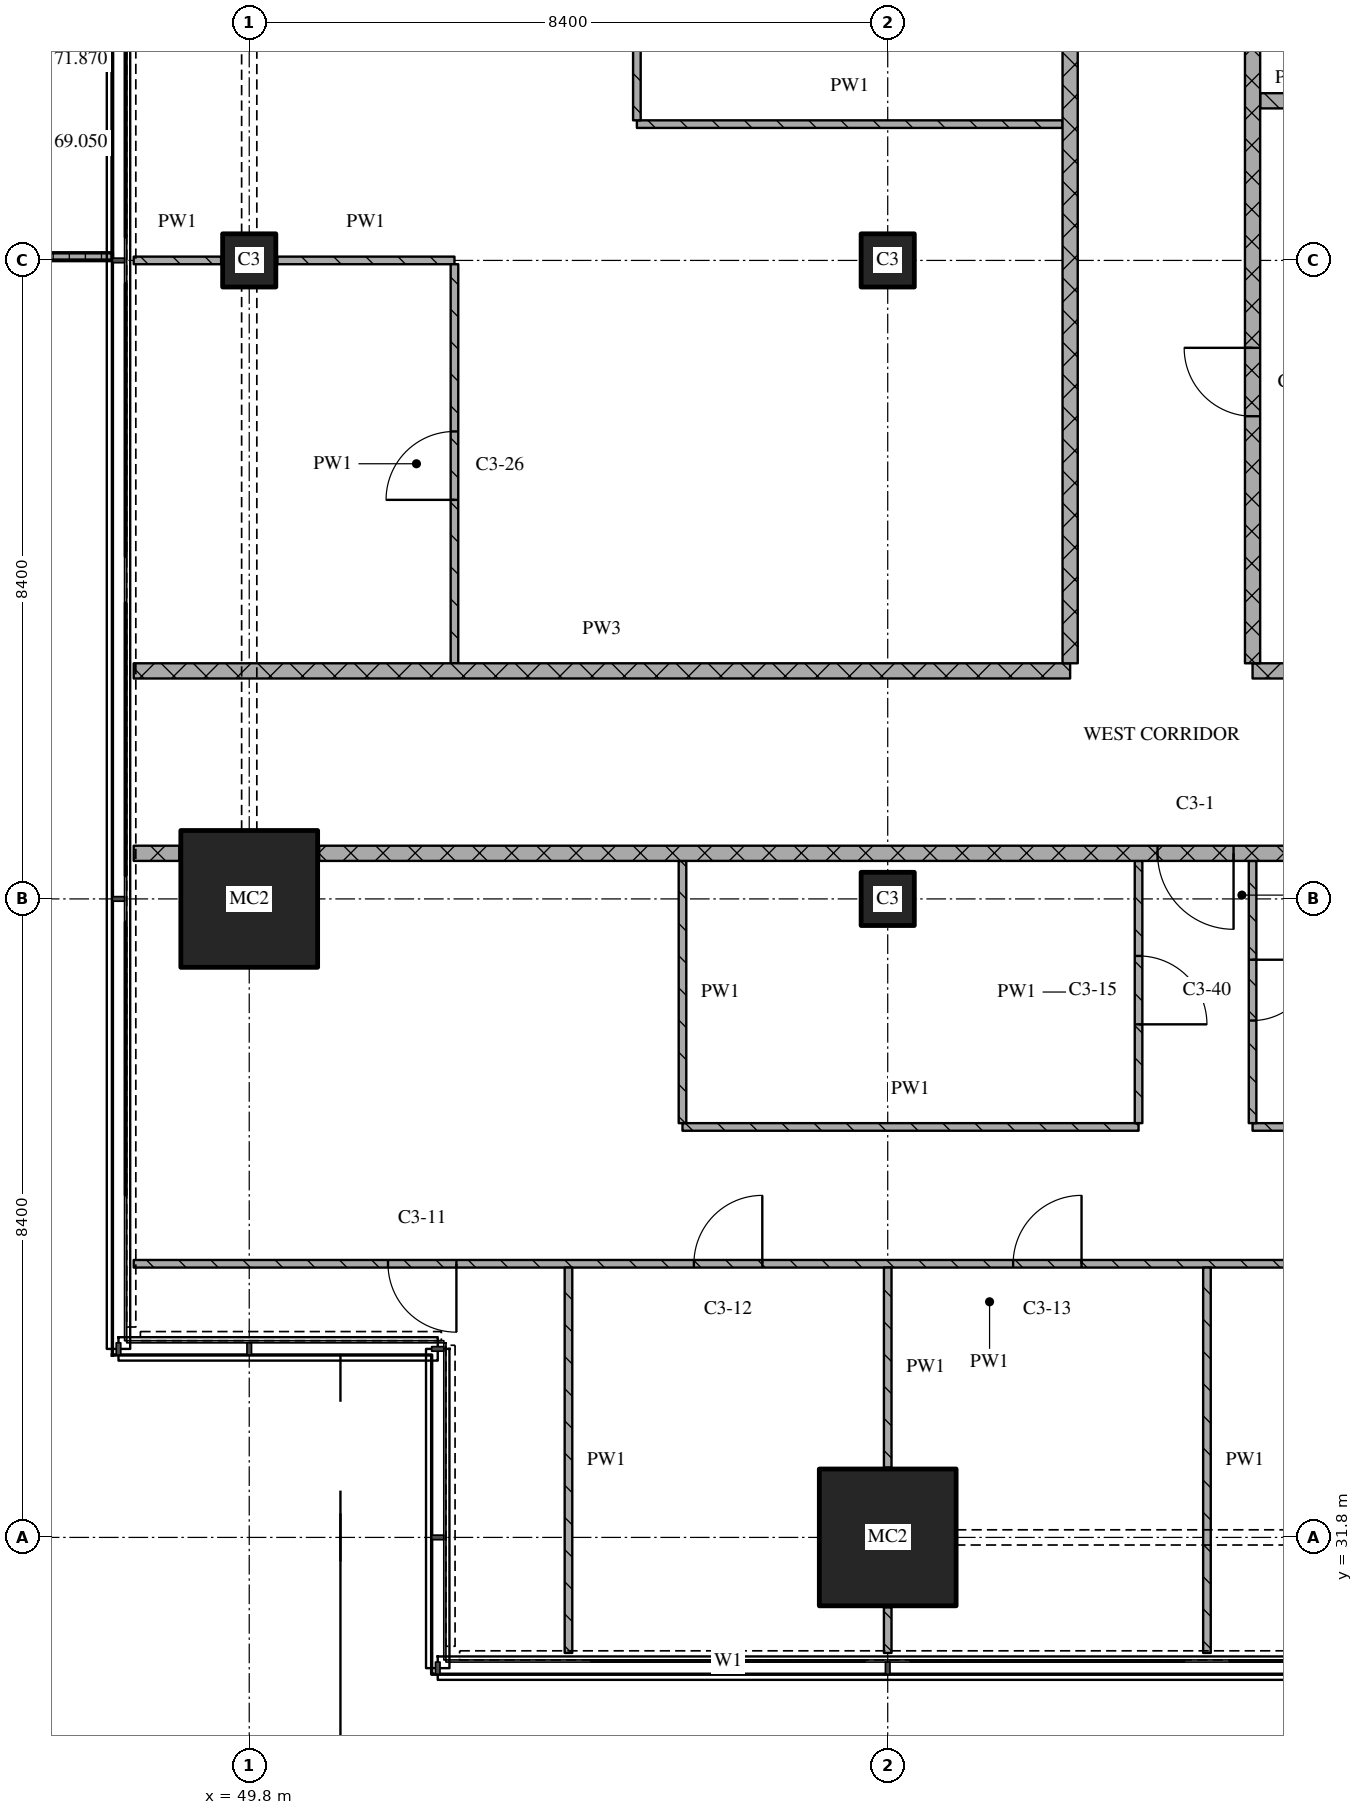
"""IFC4 building model, lengths in metres.
Left out: names, types, materials, properties, quantities, classifications, styles, units other than length and angle.
Written with IfcOpenShell. Run it as: python <this file> out.ifc"""

import sys

from ifc_helpers import new_model, si_unit, direction, frame, frame_2d, origin, origin_2d, place, context, subcontext, project, spatial, polyline, rectangle, outline, extrude, element, fill, save


model = new_model("IFC4")
c1 = context("Model", 3, precision=1e-05, world=origin(), true_north=direction((0.0, 1.0)))
c2 = subcontext(c1, "Body", "Model", "MODEL_VIEW")
j1 = project(units=[si_unit("LENGTHUNIT", "METRE"), si_unit("PLANEANGLEUNIT", "RADIAN")], contexts=[c1])
p1 = place(None, origin())
s1 = spatial("IfcSite", under=j1, at=p1, CompositionType="ELEMENT")
p2 = place(p1, origin())
s2 = spatial("IfcBuilding", under=s1, at=p2, CompositionType="ELEMENT")
p3 = place(p2, frame((0.0, 0.0, 169.05)))
s3 = spatial("IfcBuildingStorey", under=s2, at=p3, CompositionType="ELEMENT", Elevation=169.05)
p4 = place(p3, frame((49.8, 40.2, 0.0), z_axis=(0.0, 0.0, 1.0), x_axis=(1.0, 0.0, 0.0)))
e1 = element("IfcColumn", 1, at=p4, inside=s3, PredefinedType="COLUMN", context=c2, shape_type="SweptSolid", body=[
    extrude(rectangle(XDim=1.8, YDim=1.8, at=origin_2d()), origin(), (0.0, 0.0, 1.0), 3.6),
])
p5 = place(p3, frame((49.8, 48.6, 0.0), z_axis=(0.0, 0.0, 1.0), x_axis=(1.0, 0.0, 0.0)))
e2 = element("IfcColumn", 2, at=p5, inside=s3, PredefinedType="COLUMN", context=c2, shape_type="SweptSolid", body=[
    extrude(rectangle(XDim=0.7, YDim=0.7, at=origin_2d()), origin(), (0.0, 0.0, 1.0), 3.6),
])
p6 = place(p3, frame((58.2, 31.8, 0.0), z_axis=(0.0, 0.0, 1.0), x_axis=(1.0, 0.0, 0.0)))
e3 = element("IfcColumn", 3, at=p6, inside=s3, PredefinedType="COLUMN", context=c2, shape_type="SweptSolid", body=[
    extrude(rectangle(XDim=1.8, YDim=1.8, at=origin_2d()), origin(), (0.0, 0.0, 1.0), 3.6),
])
for number, where, z_axis, x_axis in (
    (4, (58.2, 40.2, 0.0), (0.0, 0.0, 1.0), (1.0, 0.0, 0.0)),
    (5, (58.2, 48.6, 0.0), (0.0, 0.0, 1.0), (1.0, 0.0, 0.0)),
):
    element("IfcColumn", number, at=place(p3, frame(where, z_axis=z_axis, x_axis=x_axis)), inside=s3, PredefinedType="COLUMN", context=c2, shape_type="SweptSolid", body=[
        extrude(rectangle(XDim=0.7, YDim=0.7, at=origin_2d()), origin(), (0.0, 0.0, 1.0), 3.6),
    ])
p7 = place(p3, origin())
e6 = element("IfcWall", 6, at=p7, inside=s3, PredefinedType="SOLIDWALL", context=c2, shape_type="SweptSolid", body=[
    extrude(outline(polyline([(48.0, 52.8), (48.0, 52.7), (46.367, 52.7), (46.367, 48.7), (48.0, 48.7), (48.0, 48.6), (46.267, 48.6), (46.267, 52.8), (48.0, 52.8)])), origin(), (0.0, 0.0, 1.0), 1.0),
])
p8 = place(p3, frame((70.8, 35.4, 0.0), z_axis=(0.0, 0.0, 1.0), x_axis=(-1.0, 0.0, 0.0)))
e7 = element("IfcWall", 7, at=p8, inside=s3, PredefinedType="PARTITIONING", context=c2, shape_type="SweptSolid", body=[
    extrude(rectangle(XDim=22.52, YDim=0.1, at=frame_2d((11.26, 0.0))), origin(), (0.0, 0.0, 1.0), 3.32),
])
p9 = place(p8, frame((10.05, 0.0, 0.0)))
e8 = element("IfcOpeningElement", 8, at=p9, cuts=e7, PredefinedType="OPENING", context=c2, shape_type="SweptSolid", body=[
    extrude(rectangle(XDim=0.9, YDim=2.1, at=frame_2d((0.45, 1.05))), frame((0.0, 0.06, 0.0), z_axis=(0.0, -1.0, 0.0), x_axis=(1.0, 0.0, 0.0)), (0.0, 0.0, 1.0), 0.12),
])
p10 = place(p8, frame((14.25, 0.0, 0.0)))
e9 = element("IfcOpeningElement", 9, at=p10, cuts=e7, PredefinedType="OPENING", context=c2, shape_type="SweptSolid", body=[
    extrude(rectangle(XDim=0.9, YDim=2.1, at=frame_2d((0.45, 1.05))), frame((0.0, 0.06, 0.0), z_axis=(0.0, -1.0, 0.0), x_axis=(1.0, 0.0, 0.0)), (0.0, 0.0, 1.0), 0.12),
])
p11 = place(p8, frame((18.274, 0.0, 0.0)))
e10 = element("IfcOpeningElement", 10, at=p11, cuts=e7, PredefinedType="OPENING", context=c2, shape_type="SweptSolid", body=[
    extrude(rectangle(XDim=0.9, YDim=2.1, at=frame_2d((0.45, 1.05))), frame((0.0, 0.06, 0.0), z_axis=(0.0, -1.0, 0.0), x_axis=(1.0, 0.0, 0.0)), (0.0, 0.0, 1.0), 0.12),
])
p12 = place(p3, frame((55.5, 37.2, 0.0), z_axis=(0.0, 0.0, 1.0), x_axis=(1.0, 0.0, 0.0)))
e11 = element("IfcWall", 11, at=p12, inside=s3, PredefinedType="PARTITIONING", context=c2, shape_type="SweptSolid", body=[
    extrude(rectangle(XDim=6.0, YDim=0.1, at=frame_2d((3.0, 0.0))), origin(), (0.0, 0.0, 1.0), 3.32),
])
p13 = place(p3, frame((63.0, 37.2, 0.0), z_axis=(0.0, 0.0, 1.0), x_axis=(1.0, 0.0, 0.0)))
e12 = element("IfcWall", 12, at=p13, inside=s3, PredefinedType="PARTITIONING", context=c2, shape_type="SweptSolid", body=[
    extrude(rectangle(XDim=11.9, YDim=0.1, at=frame_2d((5.95, 0.0))), origin(), (0.0, 0.0, 1.0), 3.32),
])
p14 = place(p13, frame((6.35, 0.0, 0.0)))
e13 = element("IfcOpeningElement", 13, at=p14, cuts=e12, PredefinedType="OPENING", context=c2, shape_type="SweptSolid", body=[
    extrude(rectangle(XDim=0.8, YDim=2.1, at=frame_2d((0.4, 1.05))), frame((0.0, 0.06, 0.0), z_axis=(0.0, -1.0, 0.0), x_axis=(1.0, 0.0, 0.0)), (0.0, 0.0, 1.0), 0.12),
])
p15 = place(p13, frame((10.05, 0.0, 0.0)))
e14 = element("IfcOpeningElement", 14, at=p15, cuts=e12, PredefinedType="OPENING", context=c2, shape_type="SweptSolid", body=[
    extrude(rectangle(XDim=0.9, YDim=2.1, at=frame_2d((0.45, 1.05))), frame((0.0, 0.06, 0.0), z_axis=(0.0, -1.0, 0.0), x_axis=(1.0, 0.0, 0.0)), (0.0, 0.0, 1.0), 0.12),
])
p16 = place(p3, frame((48.28, 40.8, 0.0), z_axis=(0.0, 0.0, 1.0), x_axis=(1.0, 0.0, 0.0)))
e15 = element("IfcWall", 15, at=p16, inside=s3, PredefinedType="PARTITIONING", context=c2, shape_type="SweptSolid", body=[
    extrude(rectangle(XDim=0.6, YDim=0.2, at=frame_2d((0.3, 0.0))), origin(), (0.0, 0.0, 1.0), 3.32),
])
p17 = place(p3, frame((75.0, 40.8, 0.0), z_axis=(0.0, 0.0, 1.0), x_axis=(-1.0, 0.0, 0.0)))
e16 = element("IfcWall", 16, at=p17, inside=s3, PredefinedType="PARTITIONING", context=c2, shape_type="SweptSolid", body=[
    extrude(rectangle(XDim=24.28, YDim=0.2, at=frame_2d((12.14, 0.0))), origin(), (0.0, 0.0, 1.0), 3.32),
])
p18 = place(p17, frame((12.25, 0.0, 0.0)))
e17 = element("IfcOpeningElement", 17, at=p18, cuts=e16, PredefinedType="OPENING", context=c2, shape_type="SweptSolid", body=[
    extrude(rectangle(XDim=1.0, YDim=2.1, at=frame_2d((0.5, 1.05))), frame((0.0, 0.11, 0.0), z_axis=(0.0, -1.0, 0.0), x_axis=(1.0, 0.0, 0.0)), (0.0, 0.0, 1.0), 0.22),
])
p19 = place(p3, frame((48.28, 43.2, 0.0), z_axis=(0.0, 0.0, 1.0), x_axis=(1.0, 0.0, 0.0)))
e18 = element("IfcWall", 18, at=p19, inside=s3, PredefinedType="PARTITIONING", context=c2, shape_type="SweptSolid", body=[
    extrude(rectangle(XDim=12.32, YDim=0.2, at=frame_2d((6.16, 0.0))), origin(), (0.0, 0.0, 1.0), 3.32),
])
p20 = place(p3, frame((63.0, 43.2, 0.0), z_axis=(0.0, 0.0, 1.0), x_axis=(1.0, 0.0, 0.0)))
e19 = element("IfcWall", 19, at=p20, inside=s3, PredefinedType="PARTITIONING", context=c2, shape_type="SweptSolid", body=[
    extrude(rectangle(XDim=5.2, YDim=0.2, at=frame_2d((2.6, 0.0))), origin(), (0.0, 0.0, 1.0), 3.32),
])
p21 = place(p3, frame((48.28, 48.6, 0.0), z_axis=(0.0, 0.0, 1.0), x_axis=(1.0, 0.0, 0.0)))
e20 = element("IfcWall", 20, at=p21, inside=s3, PredefinedType="PARTITIONING", context=c2, shape_type="SweptSolid", body=[
    extrude(rectangle(XDim=1.15, YDim=0.1, at=frame_2d((0.575, 0.0))), origin(), (0.0, 0.0, 1.0), 3.32),
])
p22 = place(p3, frame((50.17, 48.6, 0.0), z_axis=(0.0, 0.0, 1.0), x_axis=(1.0, 0.0, 0.0)))
e21 = element("IfcWall", 21, at=p22, inside=s3, PredefinedType="PARTITIONING", context=c2, shape_type="SweptSolid", body=[
    extrude(rectangle(XDim=2.33, YDim=0.1, at=frame_2d((1.165, 0.0))), origin(), (0.0, 0.0, 1.0), 3.32),
])
p23 = place(p3, frame((54.9, 50.393, 0.0), z_axis=(0.0, 0.0, 1.0), x_axis=(1.0, 0.0, 0.0)))
e22 = element("IfcWall", 22, at=p23, inside=s3, PredefinedType="PARTITIONING", context=c2, shape_type="SweptSolid", body=[
    extrude(rectangle(XDim=5.6, YDim=0.1, at=frame_2d((2.8, 0.0))), origin(), (0.0, 0.0, 1.0), 3.32),
])
p24 = place(p3, frame((63.1, 50.7, 0.0), z_axis=(0.0, 0.0, 1.0), x_axis=(1.0, 0.0, 0.0)))
e23 = element("IfcWall", 23, at=p24, inside=s3, PredefinedType="PARTITIONING", context=c2, shape_type="SweptSolid", body=[
    extrude(rectangle(XDim=5.1, YDim=0.2, at=frame_2d((2.55, 0.0))), origin(), (0.0, 0.0, 1.0), 3.32),
])
p25 = place(p3, frame((52.5, 43.3, 0.0), z_axis=(0.0, 0.0, 1.0), x_axis=(0.0, 1.0, 0.0)))
e24 = element("IfcWall", 24, at=p25, inside=s3, PredefinedType="PARTITIONING", context=c2, shape_type="SweptSolid", body=[
    extrude(rectangle(XDim=5.25, YDim=0.1, at=frame_2d((2.625, 0.0))), origin(), (0.0, 0.0, 1.0), 3.32),
])
p26 = place(p25, frame((2.15, 0.0, 0.0)))
e25 = element("IfcOpeningElement", 25, at=p26, cuts=e24, PredefinedType="OPENING", context=c2, shape_type="SweptSolid", body=[
    extrude(rectangle(XDim=0.9, YDim=2.1, at=frame_2d((0.45, 1.05))), frame((0.0, 0.06, 0.0), z_axis=(0.0, -1.0, 0.0), x_axis=(1.0, 0.0, 0.0)), (0.0, 0.0, 1.0), 0.12),
])
p27 = place(p3, frame((54.0, 35.35, 0.0), z_axis=(0.0, 0.0, 1.0), x_axis=(0.0, -1.0, 0.0)))
e26 = element("IfcWall", 26, at=p27, inside=s3, PredefinedType="PARTITIONING", context=c2, shape_type="SweptSolid", body=[
    extrude(rectangle(XDim=5.07, YDim=0.1, at=frame_2d((2.535, 0.0))), origin(), (0.0, 0.0, 1.0), 3.32),
])
p28 = place(p3, frame((54.9, 54.85, 0.0), z_axis=(0.0, 0.0, 1.0), x_axis=(0.0, -1.0, 0.0)))
e27 = element("IfcWall", 27, at=p28, inside=s3, PredefinedType="PARTITIONING", context=c2, shape_type="SweptSolid", body=[
    extrude(rectangle(XDim=4.407, YDim=0.1, at=frame_2d((2.204, 0.0))), origin(), (0.0, 0.0, 1.0), 3.32),
])
p29 = place(p3, frame((55.5, 40.7, 0.0), z_axis=(0.0, 0.0, 1.0), x_axis=(0.0, -1.0, 0.0)))
e28 = element("IfcWall", 28, at=p29, inside=s3, PredefinedType="PARTITIONING", context=c2, shape_type="SweptSolid", body=[
    extrude(rectangle(XDim=3.45, YDim=0.1, at=frame_2d((1.725, 0.0))), origin(), (0.0, 0.0, 1.0), 3.32),
])
p30 = place(p3, frame((58.2, 30.88, 0.0), z_axis=(0.0, 0.0, 1.0), x_axis=(0.0, -1.0, 0.0)))
e29 = element("IfcWall", 29, at=p30, inside=s3, PredefinedType="PARTITIONING", context=c2, shape_type="SweptSolid", body=[
    extrude(rectangle(XDim=0.6, YDim=0.1, at=frame_2d((0.3, 0.0))), origin(), (0.0, 0.0, 1.0), 3.32),
])
p31 = place(p3, frame((58.2, 35.35, 0.0), z_axis=(0.0, 0.0, 1.0), x_axis=(0.0, -1.0, 0.0)))
e30 = element("IfcWall", 30, at=p31, inside=s3, PredefinedType="PARTITIONING", context=c2, shape_type="SweptSolid", body=[
    extrude(rectangle(XDim=2.63, YDim=0.1, at=frame_2d((1.315, 0.0))), origin(), (0.0, 0.0, 1.0), 3.32),
])
p32 = place(p3, frame((60.6, 43.3, 0.0), z_axis=(0.0, 0.0, 1.0), x_axis=(0.0, 1.0, 0.0)))
e31 = element("IfcWall", 31, at=p32, inside=s3, PredefinedType="PARTITIONING", context=c2, shape_type="SweptSolid", body=[
    extrude(rectangle(XDim=17.8, YDim=0.2, at=frame_2d((8.9, 0.0))), origin(), (0.0, 0.0, 1.0), 3.32),
])
p33 = place(p32, frame((11.85, 0.0, 0.0)))
e32 = element("IfcOpeningElement", 32, at=p33, cuts=e31, PredefinedType="OPENING", context=c2, shape_type="SweptSolid", body=[
    extrude(rectangle(XDim=1.0, YDim=2.1, at=frame_2d((0.5, 1.05))), frame((0.0, 0.11, 0.0), z_axis=(0.0, -1.0, 0.0), x_axis=(1.0, 0.0, 0.0)), (0.0, 0.0, 1.0), 0.22),
])
p34 = place(p3, frame((61.5, 37.25, 0.0), z_axis=(0.0, 0.0, 1.0), x_axis=(0.0, 1.0, 0.0)))
e33 = element("IfcWall", 33, at=p34, inside=s3, PredefinedType="PARTITIONING", context=c2, shape_type="SweptSolid", body=[
    extrude(rectangle(XDim=3.45, YDim=0.1, at=frame_2d((1.725, 0.0))), origin(), (0.0, 0.0, 1.0), 3.32),
])
p35 = place(p34, frame((1.3, 0.0, 0.0)))
e34 = element("IfcOpeningElement", 34, at=p35, cuts=e33, PredefinedType="OPENING", context=c2, shape_type="SweptSolid", body=[
    extrude(rectangle(XDim=0.9, YDim=2.1, at=frame_2d((0.45, 1.05))), frame((0.0, 0.06, 0.0), z_axis=(0.0, -1.0, 0.0), x_axis=(1.0, 0.0, 0.0)), (0.0, 0.0, 1.0), 0.12),
])
p36 = place(p3, frame((62.4, 35.35, 0.0), z_axis=(0.0, 0.0, 1.0), x_axis=(0.0, -1.0, 0.0)))
e35 = element("IfcWall", 35, at=p36, inside=s3, PredefinedType="PARTITIONING", context=c2, shape_type="SweptSolid", body=[
    extrude(rectangle(XDim=5.07, YDim=0.1, at=frame_2d((2.535, 0.0))), origin(), (0.0, 0.0, 1.0), 3.32),
])
p37 = place(p3, frame((63.0, 58.7, 0.0), z_axis=(0.0, 0.0, 1.0), x_axis=(0.0, -1.0, 0.0)))
e36 = element("IfcWall", 36, at=p37, inside=s3, PredefinedType="PARTITIONING", context=c2, shape_type="SweptSolid", body=[
    extrude(rectangle(XDim=15.4, YDim=0.2, at=frame_2d((7.7, 0.0))), origin(), (0.0, 0.0, 1.0), 3.32),
])
p38 = place(p37, frame((3.45, 0.0, 0.0)))
e37 = element("IfcOpeningElement", 37, at=p38, cuts=e36, PredefinedType="OPENING", context=c2, shape_type="SweptSolid", body=[
    extrude(rectangle(XDim=1.0, YDim=2.1, at=frame_2d((0.5, 1.05))), frame((0.0, 0.11, 0.0), z_axis=(0.0, -1.0, 0.0), x_axis=(1.0, 0.0, 0.0)), (0.0, 0.0, 1.0), 0.22),
])
p39 = place(p37, frame((11.25, 0.0, 0.0)))
e38 = element("IfcOpeningElement", 38, at=p39, cuts=e36, PredefinedType="OPENING", context=c2, shape_type="SweptSolid", body=[
    extrude(rectangle(XDim=0.9, YDim=2.1, at=frame_2d((0.45, 1.05))), frame((0.0, 0.11, 0.0), z_axis=(0.0, -1.0, 0.0), x_axis=(1.0, 0.0, 0.0)), (0.0, 0.0, 1.0), 0.22),
])
p40 = place(p3, frame((63.0, 40.7, 0.0), z_axis=(0.0, 0.0, 1.0), x_axis=(0.0, -1.0, 0.0)))
e39 = element("IfcWall", 39, at=p40, inside=s3, PredefinedType="PARTITIONING", context=c2, shape_type="SweptSolid", body=[
    extrude(rectangle(XDim=3.45, YDim=0.1, at=frame_2d((1.725, 0.0))), origin(), (0.0, 0.0, 1.0), 3.32),
])
p41 = place(p40, frame((1.3, 0.0, 0.0)))
e40 = element("IfcOpeningElement", 40, at=p41, cuts=e39, PredefinedType="OPENING", context=c2, shape_type="SweptSolid", body=[
    extrude(rectangle(XDim=0.8, YDim=2.1, at=frame_2d((0.4, 1.05))), frame((0.0, 0.06, 0.0), z_axis=(0.0, -1.0, 0.0), x_axis=(1.0, 0.0, 0.0)), (0.0, 0.0, 1.0), 0.12),
])
p42 = place(p9, origin())
e41 = element("IfcDoor", 41, at=p42, inside=s3, OperationType="SINGLE_SWING_RIGHT", PredefinedType="DOOR", context=c2, shape_type="SweptSolid", body=[
    extrude(rectangle(XDim=0.9, YDim=2.1, at=frame_2d((0.45, 1.05))), frame((0.0, 0.025, 0.0), z_axis=(0.0, -1.0, 0.0), x_axis=(1.0, 0.0, 0.0)), (0.0, 0.0, 1.0), 0.05),
])
fill(e8, e41)
p43 = place(p10, origin())
e42 = element("IfcDoor", 42, at=p43, inside=s3, OperationType="SINGLE_SWING_RIGHT", PredefinedType="DOOR", context=c2, shape_type="SweptSolid", body=[
    extrude(rectangle(XDim=0.9, YDim=2.1, at=frame_2d((0.45, 1.05))), frame((0.0, 0.025, 0.0), z_axis=(0.0, -1.0, 0.0), x_axis=(1.0, 0.0, 0.0)), (0.0, 0.0, 1.0), 0.05),
])
fill(e9, e42)
p44 = place(p11, origin())
e43 = element("IfcDoor", 43, at=p44, inside=s3, OperationType="SINGLE_SWING_LEFT", PredefinedType="DOOR", context=c2, shape_type="SweptSolid", body=[
    extrude(rectangle(XDim=0.9, YDim=2.1, at=frame_2d((0.45, 1.05))), frame((0.0, 0.025, 0.0), z_axis=(0.0, -1.0, 0.0), x_axis=(1.0, 0.0, 0.0)), (0.0, 0.0, 1.0), 0.05),
])
fill(e10, e43)
p45 = place(p18, origin())
e44 = element("IfcDoor", 44, at=p45, inside=s3, OperationType="SINGLE_SWING_LEFT", PredefinedType="DOOR", context=c2, shape_type="SweptSolid", body=[
    extrude(rectangle(XDim=1.0, YDim=2.1, at=frame_2d((0.5, 1.05))), frame((0.0, 0.025, 0.0), z_axis=(0.0, -1.0, 0.0), x_axis=(1.0, 0.0, 0.0)), (0.0, 0.0, 1.0), 0.05),
])
fill(e17, e44)
p46 = place(p26, origin())
e45 = element("IfcDoor", 45, at=p46, inside=s3, OperationType="SINGLE_SWING_LEFT", PredefinedType="DOOR", context=c2, shape_type="SweptSolid", body=[
    extrude(rectangle(XDim=0.9, YDim=2.1, at=frame_2d((0.45, 1.05))), frame((0.0, 0.025, 0.0), z_axis=(0.0, -1.0, 0.0), x_axis=(1.0, 0.0, 0.0)), (0.0, 0.0, 1.0), 0.05),
])
fill(e25, e45)
p47 = place(p35, origin())
e46 = element("IfcDoor", 46, at=p47, inside=s3, OperationType="SINGLE_SWING_RIGHT", PredefinedType="DOOR", context=c2, shape_type="SweptSolid", body=[
    extrude(rectangle(XDim=0.9, YDim=2.1, at=frame_2d((0.45, 1.05))), frame((0.0, 0.025, 0.0), z_axis=(0.0, -1.0, 0.0), x_axis=(1.0, 0.0, 0.0)), (0.0, 0.0, 1.0), 0.05),
])
fill(e34, e46)
p48 = place(p39, origin())
e47 = element("IfcDoor", 47, at=p48, inside=s3, OperationType="SINGLE_SWING_RIGHT", PredefinedType="DOOR", context=c2, shape_type="SweptSolid", body=[
    extrude(rectangle(XDim=0.9, YDim=2.1, at=frame_2d((0.45, 1.05))), frame((0.0, 0.025, 0.0), z_axis=(0.0, -1.0, 0.0), x_axis=(1.0, 0.0, 0.0)), (0.0, 0.0, 1.0), 0.05),
])
fill(e38, e47)
p49 = place(p41, origin())
e48 = element("IfcDoor", 48, at=p49, inside=s3, OperationType="SINGLE_SWING_LEFT", PredefinedType="DOOR", context=c2, shape_type="SweptSolid", body=[
    extrude(rectangle(XDim=0.8, YDim=2.1, at=frame_2d((0.4, 1.05))), frame((0.0, 0.025, 0.0), z_axis=(0.0, -1.0, 0.0), x_axis=(1.0, 0.0, 0.0)), (0.0, 0.0, 1.0), 0.05),
])
fill(e40, e48)
save(model, sys.argv[1])
